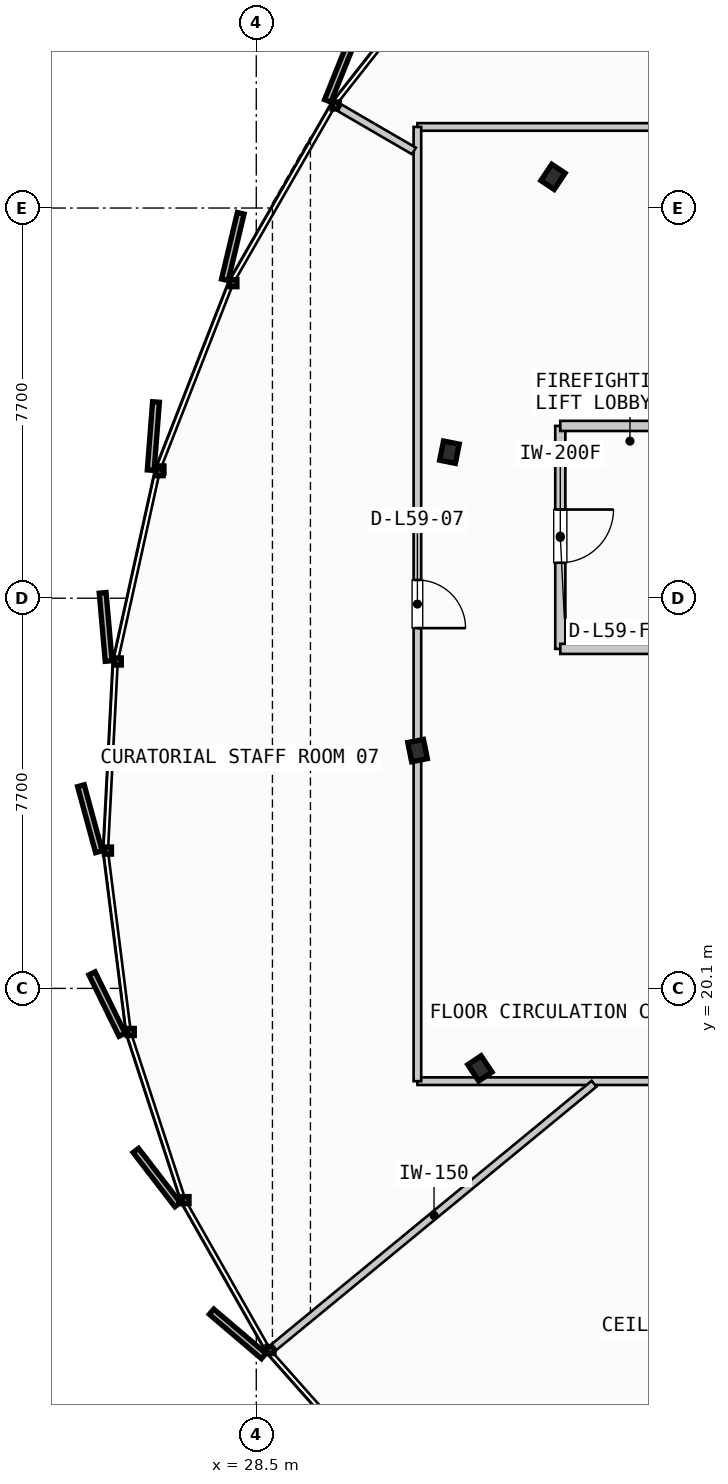
"""IFC4 building model, lengths in metres.
Left out: names, types, materials, properties, quantities, classifications, styles, units other than length and angle.
Written with IfcOpenShell. Run it as: python <this file> out.ifc"""

import sys

from ifc_helpers import new_model, si_unit, direction, frame, frame_2d, origin, origin_2d, place, context, subcontext, project, spatial, rectangle, i_section, extrude, source, transform, mapped, element, fill, save


model = new_model("IFC4")
c1 = context("Model", 3, precision=1e-05, world=origin(), true_north=direction((0.0, 1.0)))
c2 = subcontext(c1, "Body", "Model", "MODEL_VIEW")
j1 = project(units=[si_unit("LENGTHUNIT", "METRE"), si_unit("PLANEANGLEUNIT", "RADIAN")], contexts=[c1])
p1 = place(None, origin())
s1 = spatial("IfcSite", under=j1, at=p1, CompositionType="ELEMENT")
p2 = place(p1, origin())
s2 = spatial("IfcBuilding", under=s1, at=p2, CompositionType="ELEMENT")
p3 = place(p2, frame((0.0, 0.0, 228.4)))
s3 = spatial("IfcBuildingStorey", under=s2, at=p3, CompositionType="ELEMENT", Elevation=228.4)
m1 = source(origin(), c2, "Body", "SweptSolid", [
    extrude(i_section(OverallWidth=0.387, OverallDepth=0.316, WebThickness=0.019, FlangeThickness=0.028, FilletRadius=0.015, at=origin_2d()), origin(), (0.0, 0.0, 1.0), 3.21),
])
for number, where, z_axis, x_axis in (
    (1, (34.356, 36.115, 0.0), (0.0, 0.0, 1.0), (-0.831, 0.556, 0.0)),
    (2, (32.312, 30.682, 0.0), (0.0, 0.0, 1.0), (-0.981, 0.195, 0.0)),
    (3, (31.683, 24.793, 0.0), (0.0, 0.0, 1.0), (-0.981, -0.195, 0.0)),
    (4, (32.913, 18.521, 0.0), (0.0, 0.0, 1.0), (-0.831, -0.556, 0.0)),
):
    element("IfcColumn", number, at=place(p3, frame(where, z_axis=z_axis, x_axis=x_axis)), inside=s3, PredefinedType="COLUMN", context=c2, shape_type="MappedRepresentation", body=[
        mapped(m1, transform((0.0, 0.0, 0.0), scale=1.0)),
    ])
p4 = place(p3, frame((34.5, 31.2, 0.0), z_axis=(0.0, 0.0, 1.0), x_axis=(0.0, -1.0, 0.0)))
e5 = element("IfcWall", 5, at=p4, inside=s3, PredefinedType="PARTITIONING", context=c2, shape_type="SweptSolid", body=[
    extrude(rectangle(XDim=4.4, YDim=0.2, at=frame_2d((2.2, 0.0))), origin(), (0.0, 0.0, 1.0), 2.28),
])
p5 = place(p4, frame((1.65, 0.0, 0.0)))
e6 = element("IfcOpeningElement", 6, at=p5, cuts=e5, PredefinedType="OPENING", context=c2, shape_type="SweptSolid", body=[
    extrude(rectangle(XDim=1.05, YDim=2.15, at=frame_2d((0.525, 1.075))), frame((0.0, 0.11, 0.0), z_axis=(0.0, -1.0, 0.0), x_axis=(1.0, 0.0, 0.0)), (0.0, 0.0, 1.0), 0.22),
])
for number, where, z_axis, x_axis in (
    (7, (34.5, 26.8, 0.0), (0.0, 0.0, 1.0), (1.0, 0.0, 0.0)),
    (8, (34.5, 31.2, 0.0), (0.0, 0.0, 1.0), (1.0, 0.0, 0.0)),
):
    element("IfcWall", number, at=place(p3, frame(where, z_axis=z_axis, x_axis=x_axis)), inside=s3, PredefinedType="PARTITIONING", context=c2, shape_type="SweptSolid", body=[
        extrude(rectangle(XDim=3.265, YDim=0.2, at=frame_2d((1.632, 0.0))), origin(), (0.0, 0.0, 1.0), 2.28),
    ])
p6 = place(p3, frame((31.68, 18.269, 0.0), z_axis=(0.0, 0.0, 1.0), x_axis=(1.0, 0.0, 0.0)))
e9 = element("IfcWall", 9, at=p6, inside=s3, PredefinedType="PARTITIONING", context=c2, shape_type="SweptSolid", body=[
    extrude(rectangle(XDim=28.87, YDim=0.15, at=frame_2d((14.435, 0.0))), origin(), (0.0, 0.0, 1.0), 2.28),
])
p7 = place(p6, frame((7.324, 0.0, 0.0)))
e10 = element("IfcOpeningElement", 10, at=p7, cuts=e9, PredefinedType="OPENING", context=c2, shape_type="SweptSolid", body=[
    extrude(rectangle(XDim=0.95, YDim=2.15, at=frame_2d((0.475, 1.075))), frame((0.0, 0.085, 0.0), z_axis=(0.0, -1.0, 0.0), x_axis=(1.0, 0.0, 0.0)), (0.0, 0.0, 1.0), 0.17),
])
p8 = place(p6, frame((18.49, 0.0, 0.0)))
e11 = element("IfcOpeningElement", 11, at=p8, cuts=e9, PredefinedType="OPENING", context=c2, shape_type="SweptSolid", body=[
    extrude(rectangle(XDim=0.95, YDim=2.15, at=frame_2d((0.475, 1.075))), frame((0.0, 0.085, 0.0), z_axis=(0.0, -1.0, 0.0), x_axis=(1.0, 0.0, 0.0)), (0.0, 0.0, 1.0), 0.17),
])
p9 = place(p3, frame((60.55, 37.1, 0.0), z_axis=(0.0, 0.0, 1.0), x_axis=(-1.0, 0.0, 0.0)))
e12 = element("IfcWall", 12, at=p9, inside=s3, PredefinedType="PARTITIONING", context=c2, shape_type="SweptSolid", body=[
    extrude(rectangle(XDim=28.87, YDim=0.15, at=frame_2d((14.435, 0.0))), origin(), (0.0, 0.0, 1.0), 2.28),
])
p10 = place(p9, frame((5.324, 0.0, 0.0)))
e13 = element("IfcOpeningElement", 13, at=p10, cuts=e12, PredefinedType="OPENING", context=c2, shape_type="SweptSolid", body=[
    extrude(rectangle(XDim=0.95, YDim=2.15, at=frame_2d((0.475, 1.075))), frame((0.0, 0.085, 0.0), z_axis=(0.0, -1.0, 0.0), x_axis=(1.0, 0.0, 0.0)), (0.0, 0.0, 1.0), 0.17),
])
p11 = place(p9, frame((12.932, 0.0, 0.0)))
e14 = element("IfcOpeningElement", 14, at=p11, cuts=e12, PredefinedType="OPENING", context=c2, shape_type="SweptSolid", body=[
    extrude(rectangle(XDim=0.95, YDim=2.15, at=frame_2d((0.475, 1.075))), frame((0.0, 0.085, 0.0), z_axis=(0.0, -1.0, 0.0), x_axis=(1.0, 0.0, 0.0)), (0.0, 0.0, 1.0), 0.17),
])
p12 = place(p9, frame((22.557, 0.0, 0.0)))
e15 = element("IfcOpeningElement", 15, at=p12, cuts=e12, PredefinedType="OPENING", context=c2, shape_type="SweptSolid", body=[
    extrude(rectangle(XDim=0.95, YDim=2.15, at=frame_2d((0.475, 1.075))), frame((0.0, 0.085, 0.0), z_axis=(0.0, -1.0, 0.0), x_axis=(1.0, 0.0, 0.0)), (0.0, 0.0, 1.0), 0.17),
])
p13 = place(p3, frame((31.68, 37.1, 0.0), z_axis=(0.0, 0.0, 1.0), x_axis=(0.0, -1.0, 0.0)))
e16 = element("IfcWall", 16, at=p13, inside=s3, PredefinedType="PARTITIONING", context=c2, shape_type="SweptSolid", body=[
    extrude(rectangle(XDim=18.831, YDim=0.15, at=frame_2d((9.416, 0.0))), origin(), (0.0, 0.0, 1.0), 2.28),
])
p14 = place(p13, frame((8.94, 0.0, 0.0)))
e17 = element("IfcOpeningElement", 17, at=p14, cuts=e16, PredefinedType="OPENING", context=c2, shape_type="SweptSolid", body=[
    extrude(rectangle(XDim=0.95, YDim=2.15, at=frame_2d((0.475, 1.075))), frame((0.0, 0.085, 0.0), z_axis=(0.0, -1.0, 0.0), x_axis=(1.0, 0.0, 0.0)), (0.0, 0.0, 1.0), 0.17),
])
p15 = place(p3, frame((35.166, 18.218, 0.0), z_axis=(0.0, 0.0, 1.0), x_axis=(-0.772174872744, -0.635410076961, 0.0)))
e18 = element("IfcWall", 18, at=p15, inside=s3, PredefinedType="PARTITIONING", context=c2, shape_type="SweptSolid", body=[
    extrude(rectangle(XDim=8.179, YDim=0.15, at=frame_2d((4.09, 0.0))), origin(), (0.0, 0.0, 1.0), 2.28),
])
p16 = place(p3, frame((31.611, 36.626, 0.0), z_axis=(0.0, 0.0, 1.0), x_axis=(-0.864534817788, 0.502572928869, 0.0)))
e19 = element("IfcWall", 19, at=p16, inside=s3, PredefinedType="PARTITIONING", context=c2, shape_type="SweptSolid", body=[
    extrude(rectangle(XDim=1.696, YDim=0.15, at=frame_2d((0.848, 0.0))), origin(), (0.0, 0.0, 1.0), 2.28),
])
m2 = source(origin(), c2, "Body", "SweptSolid", [
    extrude(rectangle(XDim=1.05, YDim=2.15, at=frame_2d((0.525, 1.075))), frame((0.0, 0.025, 0.0), z_axis=(0.0, -1.0, 0.0), x_axis=(1.0, 0.0, 0.0)), (0.0, 0.0, 1.0), 0.05),
])
p17 = place(p5, origin())
e20 = element("IfcDoor", 20, at=p17, inside=s3, OperationType="SINGLE_SWING_LEFT", PredefinedType="DOOR", context=c2, shape_type="MappedRepresentation", body=[
    mapped(m2, transform((0.0, 0.0, 0.0), scale=1.0)),
])
fill(e6, e20)
m3 = source(origin(), c2, "Body", "SweptSolid", [
    extrude(rectangle(XDim=0.95, YDim=2.15, at=frame_2d((0.475, 1.075))), frame((0.0, 0.025, 0.0), z_axis=(0.0, -1.0, 0.0), x_axis=(1.0, 0.0, 0.0)), (0.0, 0.0, 1.0), 0.05),
])
p18 = place(p14, origin())
e21 = element("IfcDoor", 21, at=p18, inside=s3, OperationType="SINGLE_SWING_RIGHT", PredefinedType="DOOR", context=c2, shape_type="MappedRepresentation", body=[
    mapped(m3, transform((0.0, 0.0, 0.0), scale=1.0)),
])
fill(e17, e21)
save(model, sys.argv[1])
